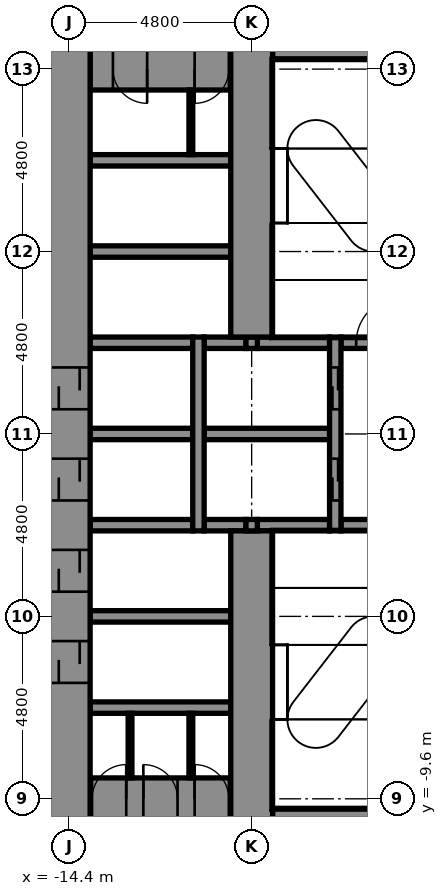
"""IFC4 building model, lengths in metres.
Left out: names, types, materials, properties, quantities, classifications, styles, units other than length and angle.
Written with IfcOpenShell. Run it as: python <this file> out.ifc"""

import sys

from ifc_helpers import new_model, si_unit, direction, frame, frame_2d, origin, place, context, subcontext, project, spatial, rectangle, extrude, element, fill, save


model = new_model("IFC4")
c1 = context("Model", 3, precision=1e-05, world=origin(), true_north=direction((0.0, 1.0)))
c2 = subcontext(c1, "Body", "Model", "MODEL_VIEW")
j1 = project(units=[si_unit("LENGTHUNIT", "METRE"), si_unit("PLANEANGLEUNIT", "RADIAN")], contexts=[c1])
p1 = place(None, origin())
s1 = spatial("IfcSite", under=j1, at=p1, CompositionType="ELEMENT")
p2 = place(p1, origin())
s2 = spatial("IfcBuilding", under=s1, at=p2, CompositionType="ELEMENT")
p3 = place(p2, frame((0.0, 0.0, 44.4)))
s3 = spatial("IfcBuildingStorey", under=s2, at=p3, CompositionType="ELEMENT", Elevation=44.4)
p4 = place(p3, frame((-9.05, -10.0, -0.25), z_axis=(0.0, 0.0, 1.0), x_axis=(1.0, 0.0, 0.0)))
e1 = element("IfcWall", 1, at=p4, inside=s3, PredefinedType="STANDARD", context=c2, shape_type="SweptSolid", body=[
    extrude(rectangle(XDim=3.8, YDim=0.3, at=frame_2d((1.9, 0.0))), origin(), (0.0, 0.0, 1.0), 5.5),
])
p5 = place(p3, frame((-13.85, -9.6, -0.25), z_axis=(0.0, 0.0, 1.0), x_axis=(1.0, 0.0, 0.0)))
e2 = element("IfcWall", 2, at=p5, inside=s3, PredefinedType="SHEAR", context=c2, shape_type="SweptSolid", body=[
    extrude(rectangle(XDim=3.7, YDim=1.1, at=frame_2d((1.85, 0.0))), origin(), (0.0, 0.0, 1.0), 5.5),
])
p6 = place(p5, frame((0.05, 0.0, 0.25)))
e3 = element("IfcOpeningElement", 3, at=p6, cuts=e2, PredefinedType="OPENING", context=c2, shape_type="SweptSolid", body=[
    extrude(rectangle(XDim=0.9, YDim=2.1, at=frame_2d((0.45, 1.05))), frame((0.0, 0.56, 0.0), z_axis=(0.0, -1.0, 0.0), x_axis=(1.0, 0.0, 0.0)), (0.0, 0.0, 1.0), 1.12),
])
p7 = place(p5, frame((1.4, 0.0, 0.25)))
e4 = element("IfcOpeningElement", 4, at=p7, cuts=e2, PredefinedType="OPENING", context=c2, shape_type="SweptSolid", body=[
    extrude(rectangle(XDim=0.9, YDim=2.1, at=frame_2d((0.45, 1.05))), frame((0.0, 0.56, 0.0), z_axis=(0.0, -1.0, 0.0), x_axis=(1.0, 0.0, 0.0)), (0.0, 0.0, 1.0), 1.12),
])
p8 = place(p5, frame((2.75, 0.0, 0.25)))
e5 = element("IfcOpeningElement", 5, at=p8, cuts=e2, PredefinedType="OPENING", context=c2, shape_type="SweptSolid", body=[
    extrude(rectangle(XDim=0.9, YDim=2.1, at=frame_2d((0.45, 1.05))), frame((0.0, 0.56, 0.0), z_axis=(0.0, -1.0, 0.0), x_axis=(1.0, 0.0, 0.0)), (0.0, 0.0, 1.0), 1.12),
])
for number, where, z_axis, x_axis in (
    (6, (-13.85, -7.2, -0.25), (0.0, 0.0, 1.0), (1.0, 0.0, 0.0)),
    (7, (-13.85, -4.8, -0.25), (0.0, 0.0, 1.0), (1.0, 0.0, 0.0)),
):
    element("IfcWall", number, at=place(p3, frame(where, z_axis=z_axis, x_axis=x_axis)), inside=s3, PredefinedType="STANDARD", context=c2, shape_type="SweptSolid", body=[
        extrude(rectangle(XDim=3.7, YDim=0.3, at=frame_2d((1.85, 0.0))), origin(), (0.0, 0.0, 1.0), 5.5),
    ])
p9 = place(p3, frame((-13.85, -2.4, -0.25), z_axis=(0.0, 0.0, 1.0), x_axis=(1.0, 0.0, 0.0)))
e8 = element("IfcWall", 8, at=p9, inside=s3, PredefinedType="STANDARD", context=c2, shape_type="SweptSolid", body=[
    extrude(rectangle(XDim=2.7, YDim=0.3, at=frame_2d((1.35, 0.0))), origin(), (0.0, 0.0, 1.0), 5.5),
])
p10 = place(p3, frame((-10.85, -2.4, -0.25), z_axis=(0.0, 0.0, 1.0), x_axis=(1.0, 0.0, 0.0)))
e9 = element("IfcWall", 9, at=p10, inside=s3, PredefinedType="STANDARD", context=c2, shape_type="SweptSolid", body=[
    extrude(rectangle(XDim=1.1, YDim=0.3, at=frame_2d((0.55, 0.0))), origin(), (0.0, 0.0, 1.0), 5.5),
])
p11 = place(p3, frame((-9.45, -2.4, -0.25), z_axis=(0.0, 0.0, 1.0), x_axis=(1.0, 0.0, 0.0)))
e10 = element("IfcWall", 10, at=p11, inside=s3, PredefinedType="STANDARD", context=c2, shape_type="SweptSolid", body=[
    extrude(rectangle(XDim=1.9, YDim=0.3, at=frame_2d((0.95, 0.0))), origin(), (0.0, 0.0, 1.0), 5.5),
])
p12 = place(p3, frame((-7.25, -2.4, -0.25), z_axis=(0.0, 0.0, 1.0), x_axis=(1.0, 0.0, 0.0)))
e11 = element("IfcWall", 11, at=p12, inside=s3, PredefinedType="STANDARD", context=c2, shape_type="SweptSolid", body=[
    extrude(rectangle(XDim=2.0, YDim=0.3, at=frame_2d((1.0, 0.0))), origin(), (0.0, 0.0, 1.0), 5.5),
])
p13 = place(p3, frame((-13.85, 0.0, -0.25), z_axis=(0.0, 0.0, 1.0), x_axis=(1.0, 0.0, 0.0)))
e12 = element("IfcWall", 12, at=p13, inside=s3, PredefinedType="STANDARD", context=c2, shape_type="SweptSolid", body=[
    extrude(rectangle(XDim=2.7, YDim=0.3, at=frame_2d((1.35, 0.0))), origin(), (0.0, 0.0, 1.0), 5.5),
])
p14 = place(p3, frame((-10.85, 0.0, -0.25), z_axis=(0.0, 0.0, 1.0), x_axis=(1.0, 0.0, 0.0)))
e13 = element("IfcWall", 13, at=p14, inside=s3, PredefinedType="STANDARD", context=c2, shape_type="SweptSolid", body=[
    extrude(rectangle(XDim=3.3, YDim=0.3, at=frame_2d((1.65, 0.0))), origin(), (0.0, 0.0, 1.0), 5.5),
])
p15 = place(p3, frame((-13.85, 2.4, -0.25), z_axis=(0.0, 0.0, 1.0), x_axis=(1.0, 0.0, 0.0)))
e14 = element("IfcWall", 14, at=p15, inside=s3, PredefinedType="STANDARD", context=c2, shape_type="SweptSolid", body=[
    extrude(rectangle(XDim=2.7, YDim=0.3, at=frame_2d((1.35, 0.0))), origin(), (0.0, 0.0, 1.0), 5.5),
])
p16 = place(p3, frame((-10.85, 2.4, -0.25), z_axis=(0.0, 0.0, 1.0), x_axis=(1.0, 0.0, 0.0)))
e15 = element("IfcWall", 15, at=p16, inside=s3, PredefinedType="STANDARD", context=c2, shape_type="SweptSolid", body=[
    extrude(rectangle(XDim=1.1, YDim=0.3, at=frame_2d((0.55, 0.0))), origin(), (0.0, 0.0, 1.0), 5.5),
])
p17 = place(p3, frame((-9.45, 2.4, -0.25), z_axis=(0.0, 0.0, 1.0), x_axis=(1.0, 0.0, 0.0)))
e16 = element("IfcWall", 16, at=p17, inside=s3, PredefinedType="STANDARD", context=c2, shape_type="SweptSolid", body=[
    extrude(rectangle(XDim=1.9, YDim=0.3, at=frame_2d((0.95, 0.0))), origin(), (0.0, 0.0, 1.0), 5.5),
])
p18 = place(p3, frame((-7.25, 2.4, -0.25), z_axis=(0.0, 0.0, 1.0), x_axis=(1.0, 0.0, 0.0)))
e17 = element("IfcWall", 17, at=p18, inside=s3, PredefinedType="STANDARD", context=c2, shape_type="SweptSolid", body=[
    extrude(rectangle(XDim=2.0, YDim=0.3, at=frame_2d((1.0, 0.0))), origin(), (0.0, 0.0, 1.0), 5.5),
])
p19 = place(p18, frame((0.4, 0.0, 0.25)))
e18 = element("IfcOpeningElement", 18, at=p19, cuts=e17, PredefinedType="OPENING", context=c2, shape_type="SweptSolid", body=[
    extrude(rectangle(XDim=1.2, YDim=2.1, at=frame_2d((0.6, 1.05))), frame((0.0, 0.16, 0.0), z_axis=(0.0, -1.0, 0.0), x_axis=(1.0, 0.0, 0.0)), (0.0, 0.0, 1.0), 0.32),
])
for number, where, z_axis, x_axis in (
    (19, (-13.85, 4.8, -0.25), (0.0, 0.0, 1.0), (1.0, 0.0, 0.0)),
    (20, (-13.85, 7.2, -0.25), (0.0, 0.0, 1.0), (1.0, 0.0, 0.0)),
):
    element("IfcWall", number, at=place(p3, frame(where, z_axis=z_axis, x_axis=x_axis)), inside=s3, PredefinedType="STANDARD", context=c2, shape_type="SweptSolid", body=[
        extrude(rectangle(XDim=3.7, YDim=0.3, at=frame_2d((1.85, 0.0))), origin(), (0.0, 0.0, 1.0), 5.5),
    ])
p20 = place(p3, frame((-13.85, 9.6, -0.25), z_axis=(0.0, 0.0, 1.0), x_axis=(1.0, 0.0, 0.0)))
e21 = element("IfcWall", 21, at=p20, inside=s3, PredefinedType="SHEAR", context=c2, shape_type="SweptSolid", body=[
    extrude(rectangle(XDim=3.7, YDim=1.1, at=frame_2d((1.85, 0.0))), origin(), (0.0, 0.0, 1.0), 5.5),
])
p21 = place(p20, frame((0.6, 0.0, 0.25)))
e22 = element("IfcOpeningElement", 22, at=p21, cuts=e21, PredefinedType="OPENING", context=c2, shape_type="SweptSolid", body=[
    extrude(rectangle(XDim=0.9, YDim=2.1, at=frame_2d((0.45, 1.05))), frame((0.0, 0.56, 0.0), z_axis=(0.0, -1.0, 0.0), x_axis=(1.0, 0.0, 0.0)), (0.0, 0.0, 1.0), 1.12),
])
p22 = place(p20, frame((2.75, 0.0, 0.25)))
e23 = element("IfcOpeningElement", 23, at=p22, cuts=e21, PredefinedType="OPENING", context=c2, shape_type="SweptSolid", body=[
    extrude(rectangle(XDim=0.9, YDim=2.1, at=frame_2d((0.45, 1.05))), frame((0.0, 0.56, 0.0), z_axis=(0.0, -1.0, 0.0), x_axis=(1.0, 0.0, 0.0)), (0.0, 0.0, 1.0), 1.12),
])
p23 = place(p3, frame((-9.05, 10.0, -0.25), z_axis=(0.0, 0.0, 1.0), x_axis=(1.0, 0.0, 0.0)))
e24 = element("IfcWall", 24, at=p23, inside=s3, PredefinedType="STANDARD", context=c2, shape_type="SweptSolid", body=[
    extrude(rectangle(XDim=3.8, YDim=0.3, at=frame_2d((1.9, 0.0))), origin(), (0.0, 0.0, 1.0), 5.5),
])
p24 = place(p3, frame((-14.4, -10.15, -0.25), z_axis=(0.0, 0.0, 1.0), x_axis=(0.0, 1.0, 0.0)))
e25 = element("IfcWall", 25, at=p24, inside=s3, PredefinedType="SHEAR", context=c2, shape_type="SweptSolid", body=[
    extrude(rectangle(XDim=20.3, YDim=1.1, at=frame_2d((10.15, 0.0))), origin(), (0.0, 0.0, 1.0), 5.5),
])
p25 = place(p24, frame((3.6, 0.0, 0.25)))
e26 = element("IfcOpeningElement", 26, at=p25, cuts=e25, PredefinedType="OPENING", context=c2, shape_type="SweptSolid", body=[
    extrude(rectangle(XDim=1.1, YDim=2.1, at=frame_2d((0.55, 1.05))), frame((0.0, 0.56, 0.0), z_axis=(0.0, -1.0, 0.0), x_axis=(1.0, 0.0, 0.0)), (0.0, 0.0, 1.0), 1.12),
])
p26 = place(p24, frame((6.0, 0.0, 0.25)))
e27 = element("IfcOpeningElement", 27, at=p26, cuts=e25, PredefinedType="OPENING", context=c2, shape_type="SweptSolid", body=[
    extrude(rectangle(XDim=1.1, YDim=2.1, at=frame_2d((0.55, 1.05))), frame((0.0, 0.56, 0.0), z_axis=(0.0, -1.0, 0.0), x_axis=(1.0, 0.0, 0.0)), (0.0, 0.0, 1.0), 1.12),
])
p27 = place(p24, frame((8.4, 0.0, 0.25)))
e28 = element("IfcOpeningElement", 28, at=p27, cuts=e25, PredefinedType="OPENING", context=c2, shape_type="SweptSolid", body=[
    extrude(rectangle(XDim=1.1, YDim=2.1, at=frame_2d((0.55, 1.05))), frame((0.0, 0.56, 0.0), z_axis=(0.0, -1.0, 0.0), x_axis=(1.0, 0.0, 0.0)), (0.0, 0.0, 1.0), 1.12),
])
p28 = place(p24, frame((10.8, 0.0, 0.25)))
e29 = element("IfcOpeningElement", 29, at=p28, cuts=e25, PredefinedType="OPENING", context=c2, shape_type="SweptSolid", body=[
    extrude(rectangle(XDim=1.1, YDim=2.1, at=frame_2d((0.55, 1.05))), frame((0.0, 0.56, 0.0), z_axis=(0.0, -1.0, 0.0), x_axis=(1.0, 0.0, 0.0)), (0.0, 0.0, 1.0), 1.12),
])
p29 = place(p3, frame((-11.0, -2.55, -0.25), z_axis=(0.0, 0.0, 1.0), x_axis=(0.0, 1.0, 0.0)))
e30 = element("IfcWall", 30, at=p29, inside=s3, PredefinedType="STANDARD", context=c2, shape_type="SweptSolid", body=[
    extrude(rectangle(XDim=5.1, YDim=0.3, at=frame_2d((2.55, 0.0))), origin(), (0.0, 0.0, 1.0), 5.5),
])
p30 = place(p3, frame((-9.6, -10.15, -0.25), z_axis=(0.0, 0.0, 1.0), x_axis=(0.0, 1.0, 0.0)))
e31 = element("IfcWall", 31, at=p30, inside=s3, PredefinedType="SHEAR", context=c2, shape_type="SweptSolid", body=[
    extrude(rectangle(XDim=7.6, YDim=1.1, at=frame_2d((3.8, 0.0))), origin(), (0.0, 0.0, 1.0), 5.5),
])
for number, where, z_axis, x_axis in (
    (32, (-9.6, -2.55, -0.25), (0.0, 0.0, 1.0), (0.0, 1.0, 0.0)),
    (33, (-9.6, 2.25, -0.25), (0.0, 0.0, 1.0), (0.0, 1.0, 0.0)),
):
    element("IfcWall", number, at=place(p3, frame(where, z_axis=z_axis, x_axis=x_axis)), inside=s3, PredefinedType="STANDARD", context=c2, shape_type="SweptSolid", body=[
        extrude(rectangle(XDim=0.3, YDim=0.3, at=frame_2d((0.15, 0.0))), origin(), (0.0, 0.0, 1.0), 5.5),
    ])
p31 = place(p3, frame((-9.6, 2.55, -0.25), z_axis=(0.0, 0.0, 1.0), x_axis=(0.0, 1.0, 0.0)))
e34 = element("IfcWall", 34, at=p31, inside=s3, PredefinedType="SHEAR", context=c2, shape_type="SweptSolid", body=[
    extrude(rectangle(XDim=7.6, YDim=1.1, at=frame_2d((3.8, 0.0))), origin(), (0.0, 0.0, 1.0), 5.5),
])
p32 = place(p3, frame((-7.4, -2.55, -0.25), z_axis=(0.0, 0.0, 1.0), x_axis=(0.0, 1.0, 0.0)))
e35 = element("IfcWall", 35, at=p32, inside=s3, PredefinedType="STANDARD", context=c2, shape_type="SweptSolid", body=[
    extrude(rectangle(XDim=5.1, YDim=0.3, at=frame_2d((2.55, 0.0))), origin(), (0.0, 0.0, 1.0), 5.5),
])
p33 = place(p32, frame((0.8, 0.0, 0.25)))
e36 = element("IfcOpeningElement", 36, at=p33, cuts=e35, PredefinedType="OPENING", context=c2, shape_type="SweptSolid", body=[
    extrude(rectangle(XDim=1.1, YDim=2.1, at=frame_2d((0.55, 1.05))), frame((0.0, 0.16, 0.0), z_axis=(0.0, -1.0, 0.0), x_axis=(1.0, 0.0, 0.0)), (0.0, 0.0, 1.0), 0.32),
])
p34 = place(p32, frame((3.2, 0.0, 0.25)))
e37 = element("IfcOpeningElement", 37, at=p34, cuts=e35, PredefinedType="OPENING", context=c2, shape_type="SweptSolid", body=[
    extrude(rectangle(XDim=1.1, YDim=2.1, at=frame_2d((0.55, 1.05))), frame((0.0, 0.16, 0.0), z_axis=(0.0, -1.0, 0.0), x_axis=(1.0, 0.0, 0.0)), (0.0, 0.0, 1.0), 0.32),
])
for number, where, z_axis, x_axis in (
    (38, (-11.2, -9.05, 0.0), (0.0, 0.0, 1.0), (0.0, 1.0, 0.0)),
    (39, (-11.2, 7.35, 0.0), (0.0, 0.0, 1.0), (0.0, 1.0, 0.0)),
    (40, (-12.8, -9.05, 0.0), (0.0, 0.0, 1.0), (0.0, 1.0, 0.0)),
):
    element("IfcWall", number, at=place(p3, frame(where, z_axis=z_axis, x_axis=x_axis)), inside=s3, PredefinedType="PARTITIONING", context=c2, shape_type="SweptSolid", body=[
        extrude(rectangle(XDim=1.7, YDim=0.1, at=frame_2d((0.85, 0.0))), origin(), (0.0, 0.0, 1.0), 5.25),
    ])
p35 = place(p33, origin())
e41 = element("IfcDoor", 41, at=p35, inside=s3, OperationType="DOUBLE_DOOR_SLIDING", PredefinedType="DOOR", context=c2, shape_type="SweptSolid", body=[
    extrude(rectangle(XDim=1.1, YDim=2.1, at=frame_2d((0.55, 1.05))), frame((0.0, 0.025, 0.0), z_axis=(0.0, -1.0, 0.0), x_axis=(1.0, 0.0, 0.0)), (0.0, 0.0, 1.0), 0.05),
])
fill(e36, e41)
p36 = place(p34, origin())
e42 = element("IfcDoor", 42, at=p36, inside=s3, OperationType="DOUBLE_DOOR_SLIDING", PredefinedType="DOOR", context=c2, shape_type="SweptSolid", body=[
    extrude(rectangle(XDim=1.1, YDim=2.1, at=frame_2d((0.55, 1.05))), frame((0.0, 0.025, 0.0), z_axis=(0.0, -1.0, 0.0), x_axis=(1.0, 0.0, 0.0)), (0.0, 0.0, 1.0), 0.05),
])
fill(e37, e42)
p37 = place(p25, origin())
e43 = element("IfcDoor", 43, at=p37, inside=s3, OperationType="DOUBLE_DOOR_SLIDING", PredefinedType="DOOR", context=c2, shape_type="SweptSolid", body=[
    extrude(rectangle(XDim=1.1, YDim=2.1, at=frame_2d((0.55, 1.05))), frame((0.0, 0.025, 0.0), z_axis=(0.0, -1.0, 0.0), x_axis=(1.0, 0.0, 0.0)), (0.0, 0.0, 1.0), 0.05),
])
fill(e26, e43)
p38 = place(p26, origin())
e44 = element("IfcDoor", 44, at=p38, inside=s3, OperationType="DOUBLE_DOOR_SLIDING", PredefinedType="DOOR", context=c2, shape_type="SweptSolid", body=[
    extrude(rectangle(XDim=1.1, YDim=2.1, at=frame_2d((0.55, 1.05))), frame((0.0, 0.025, 0.0), z_axis=(0.0, -1.0, 0.0), x_axis=(1.0, 0.0, 0.0)), (0.0, 0.0, 1.0), 0.05),
])
fill(e27, e44)
p39 = place(p27, origin())
e45 = element("IfcDoor", 45, at=p39, inside=s3, OperationType="DOUBLE_DOOR_SLIDING", PredefinedType="DOOR", context=c2, shape_type="SweptSolid", body=[
    extrude(rectangle(XDim=1.1, YDim=2.1, at=frame_2d((0.55, 1.05))), frame((0.0, 0.025, 0.0), z_axis=(0.0, -1.0, 0.0), x_axis=(1.0, 0.0, 0.0)), (0.0, 0.0, 1.0), 0.05),
])
fill(e28, e45)
p40 = place(p28, origin())
e46 = element("IfcDoor", 46, at=p40, inside=s3, OperationType="DOUBLE_DOOR_SLIDING", PredefinedType="DOOR", context=c2, shape_type="SweptSolid", body=[
    extrude(rectangle(XDim=1.1, YDim=2.1, at=frame_2d((0.55, 1.05))), frame((0.0, 0.025, 0.0), z_axis=(0.0, -1.0, 0.0), x_axis=(1.0, 0.0, 0.0)), (0.0, 0.0, 1.0), 0.05),
])
fill(e29, e46)
p41 = place(p6, origin())
e47 = element("IfcDoor", 47, at=p41, inside=s3, OperationType="SINGLE_SWING_RIGHT", PredefinedType="DOOR", context=c2, shape_type="SweptSolid", body=[
    extrude(rectangle(XDim=0.9, YDim=2.1, at=frame_2d((0.45, 1.05))), frame((0.0, 0.025, 0.0), z_axis=(0.0, -1.0, 0.0), x_axis=(1.0, 0.0, 0.0)), (0.0, 0.0, 1.0), 0.05),
])
fill(e3, e47)
p42 = place(p7, origin())
e48 = element("IfcDoor", 48, at=p42, inside=s3, OperationType="SINGLE_SWING_LEFT", PredefinedType="DOOR", context=c2, shape_type="SweptSolid", body=[
    extrude(rectangle(XDim=0.9, YDim=2.1, at=frame_2d((0.45, 1.05))), frame((0.0, 0.025, 0.0), z_axis=(0.0, -1.0, 0.0), x_axis=(1.0, 0.0, 0.0)), (0.0, 0.0, 1.0), 0.05),
])
fill(e4, e48)
p43 = place(p8, origin())
e49 = element("IfcDoor", 49, at=p43, inside=s3, OperationType="SINGLE_SWING_LEFT", PredefinedType="DOOR", context=c2, shape_type="SweptSolid", body=[
    extrude(rectangle(XDim=0.9, YDim=2.1, at=frame_2d((0.45, 1.05))), frame((0.0, 0.025, 0.0), z_axis=(0.0, -1.0, 0.0), x_axis=(1.0, 0.0, 0.0)), (0.0, 0.0, 1.0), 0.05),
])
fill(e5, e49)
p44 = place(p21, frame((0.9, 0.0, 0.0), z_axis=(0.0, 0.0, 1.0), x_axis=(-1.0, 0.0, 0.0)))
e50 = element("IfcDoor", 50, at=p44, inside=s3, OperationType="SINGLE_SWING_RIGHT", PredefinedType="DOOR", context=c2, shape_type="SweptSolid", body=[
    extrude(rectangle(XDim=0.9, YDim=2.1, at=frame_2d((0.45, 1.05))), frame((0.0, 0.025, 0.0), z_axis=(0.0, -1.0, 0.0), x_axis=(1.0, 0.0, 0.0)), (0.0, 0.0, 1.0), 0.05),
])
fill(e22, e50)
p45 = place(p22, frame((0.9, 0.0, 0.0), z_axis=(0.0, 0.0, 1.0), x_axis=(-1.0, 0.0, 0.0)))
e51 = element("IfcDoor", 51, at=p45, inside=s3, OperationType="SINGLE_SWING_LEFT", PredefinedType="DOOR", context=c2, shape_type="SweptSolid", body=[
    extrude(rectangle(XDim=0.9, YDim=2.1, at=frame_2d((0.45, 1.05))), frame((0.0, 0.025, 0.0), z_axis=(0.0, -1.0, 0.0), x_axis=(1.0, 0.0, 0.0)), (0.0, 0.0, 1.0), 0.05),
])
fill(e23, e51)
p46 = place(p19, origin())
e52 = element("IfcDoor", 52, at=p46, inside=s3, OperationType="SINGLE_SWING_RIGHT", PredefinedType="DOOR", context=c2, shape_type="SweptSolid", body=[
    extrude(rectangle(XDim=1.2, YDim=2.1, at=frame_2d((0.6, 1.05))), frame((0.0, 0.025, 0.0), z_axis=(0.0, -1.0, 0.0), x_axis=(1.0, 0.0, 0.0)), (0.0, 0.0, 1.0), 0.05),
])
fill(e18, e52)
save(model, sys.argv[1])
